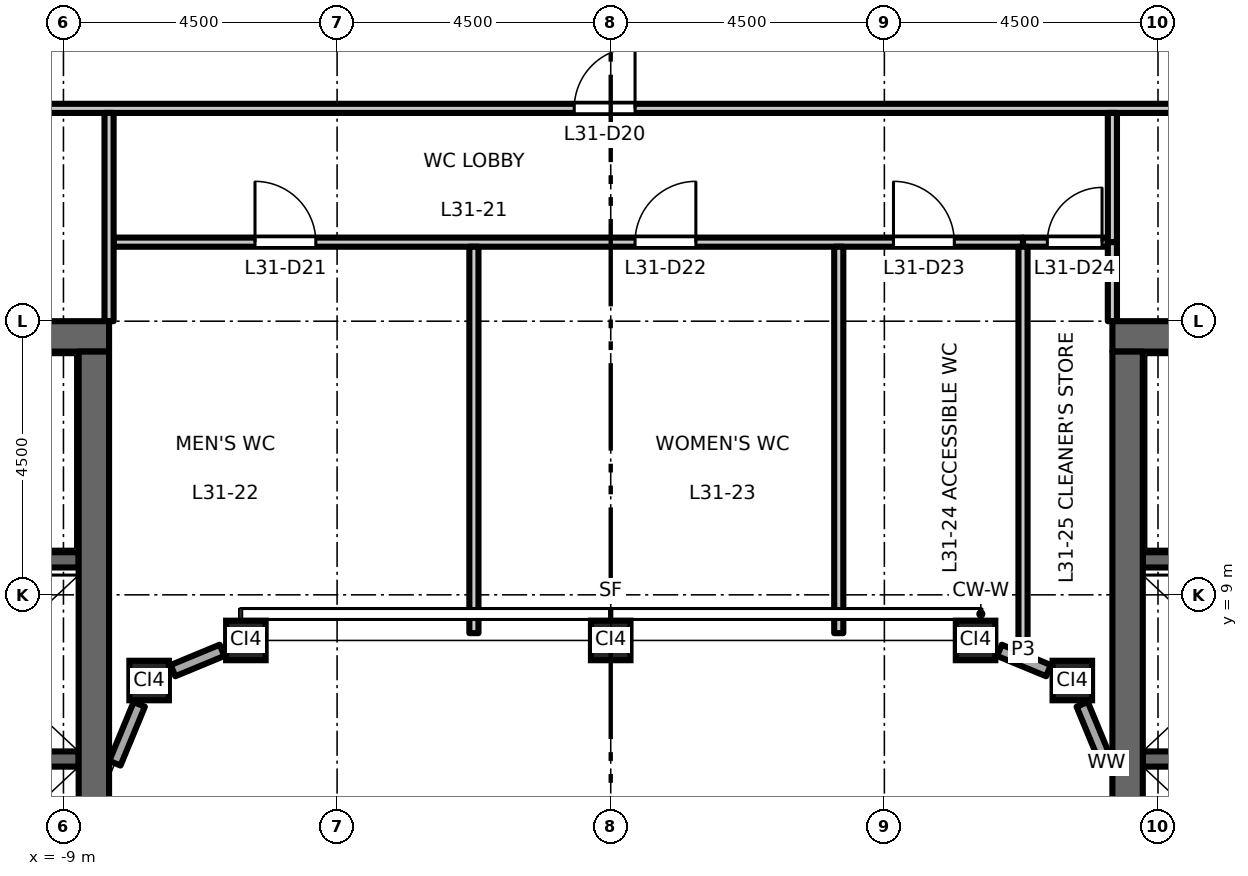
"""IFC4 building model, lengths in metres.
Left out: names, types, materials, properties, quantities, classifications, styles, units other than length and angle.
Written with IfcOpenShell. Run it as: python <this file> out.ifc"""

import sys

from ifc_helpers import new_model, si_unit, direction, frame, frame_2d, origin, origin_2d, place, context, subcontext, project, spatial, rectangle, hollow_rectangle, extrude, element, fill, save


model = new_model("IFC4")
c1 = context("Model", 3, precision=1e-05, world=origin(), true_north=direction((0.0, 1.0)))
c2 = subcontext(c1, "Body", "Model", "MODEL_VIEW")
j1 = project(units=[si_unit("LENGTHUNIT", "METRE"), si_unit("PLANEANGLEUNIT", "RADIAN")], contexts=[c1])
p1 = place(None, origin())
s1 = spatial("IfcSite", under=j1, at=p1, CompositionType="ELEMENT")
p2 = place(p1, origin())
s2 = spatial("IfcBuilding", under=s1, at=p2, CompositionType="ELEMENT")
p3 = place(p2, frame((0.0, 0.0, 145.2)))
s3 = spatial("IfcBuildingStorey", under=s2, at=p3, CompositionType="ELEMENT", Elevation=145.2)
for number, where, z_axis, x_axis in (
    (1, (-7.591, 7.591, 0.0), (0.0, 0.0, 1.0), (1.0, 0.0, 0.0)),
    (2, (-6.0, 8.25, 0.0), (0.0, 0.0, 1.0), (1.0, 0.0, 0.0)),
    (3, (0.0, 8.25, 0.0), (0.0, 0.0, 1.0), (1.0, 0.0, 0.0)),
    (4, (6.0, 8.25, 0.0), (0.0, 0.0, 1.0), (1.0, 0.0, 0.0)),
    (5, (7.591, 7.591, 0.0), (0.0, 0.0, 1.0), (1.0, 0.0, 0.0)),
):
    element("IfcColumn", number, at=place(p3, frame(where, z_axis=z_axis, x_axis=x_axis)), inside=s3, PredefinedType="COLUMN", context=c2, shape_type="SweptSolid", body=[
        extrude(hollow_rectangle(XDim=0.65, YDim=0.65, WallThickness=0.036, at=origin_2d()), origin(), (0.0, 0.0, 1.0), 4.5),
    ])
p4 = place(p3, frame((-8.75, 6.3, 0.0), z_axis=(0.0, 0.0, 1.0), x_axis=(-1.0, 0.0, 0.0)))
e6 = element("IfcWall", 6, at=p4, inside=s3, PredefinedType="SHEAR", context=c2, shape_type="SweptSolid", body=[
    extrude(rectangle(XDim=3.1, YDim=0.25, at=frame_2d((1.55, 0.0))), origin(), (0.0, 0.0, 1.0), 4.35),
])
p5 = place(p3, frame((-8.75, 9.575, 0.0), z_axis=(0.0, 0.0, 1.0), x_axis=(-1.0, 0.0, 0.0)))
e7 = element("IfcWall", 7, at=p5, inside=s3, PredefinedType="SHEAR", context=c2, shape_type="SweptSolid", body=[
    extrude(rectangle(XDim=8.0, YDim=0.25, at=frame_2d((4.0, 0.0))), origin(), (0.0, 0.0, 1.0), 4.35),
])
p6 = place(p5, frame((6.65, 0.0, 0.0)))
e8 = element("IfcOpeningElement", 8, at=p6, cuts=e7, PredefinedType="OPENING", context=c2, shape_type="SweptSolid", body=[
    extrude(rectangle(XDim=1.1, YDim=2.1, at=frame_2d((0.55, 1.05))), frame((0.0, 0.135, 0.0), z_axis=(0.0, -1.0, 0.0), x_axis=(1.0, 0.0, 0.0)), (0.0, 0.0, 1.0), 0.27),
])
p7 = place(p3, frame((-8.25, 13.25, 0.0), z_axis=(0.0, 0.0, 1.0), x_axis=(-1.0, 0.0, 0.0)))
e9 = element("IfcWall", 9, at=p7, inside=s3, PredefinedType="SHEAR", context=c2, shape_type="SweptSolid", body=[
    extrude(rectangle(XDim=13.5, YDim=0.5, at=frame_2d((6.75, 0.0))), origin(), (0.0, 0.0, 1.0), 4.35),
])
p8 = place(p3, frame((-8.5, -13.0, 0.0), z_axis=(0.0, 0.0, 1.0), x_axis=(0.0, 1.0, 0.0)))
e10 = element("IfcWall", 10, at=p8, inside=s3, PredefinedType="SHEAR", context=c2, shape_type="SweptSolid", body=[
    extrude(rectangle(XDim=26.0, YDim=0.5, at=frame_2d((13.0, 0.0))), origin(), (0.0, 0.0, 1.0), 4.35),
])
p9 = place(p3, frame((8.75, 6.3, 0.0), z_axis=(0.0, 0.0, 1.0), x_axis=(1.0, 0.0, 0.0)))
e11 = element("IfcWall", 11, at=p9, inside=s3, PredefinedType="SHEAR", context=c2, shape_type="SweptSolid", body=[
    extrude(rectangle(XDim=3.1, YDim=0.25, at=frame_2d((1.55, 0.0))), origin(), (0.0, 0.0, 1.0), 4.35),
])
p10 = place(p3, frame((8.75, 9.575, 0.0), z_axis=(0.0, 0.0, 1.0), x_axis=(1.0, 0.0, 0.0)))
e12 = element("IfcWall", 12, at=p10, inside=s3, PredefinedType="SHEAR", context=c2, shape_type="SweptSolid", body=[
    extrude(rectangle(XDim=8.0, YDim=0.25, at=frame_2d((4.0, 0.0))), origin(), (0.0, 0.0, 1.0), 4.35),
])
p11 = place(p10, frame((6.65, 0.0, 0.0)))
e13 = element("IfcOpeningElement", 13, at=p11, cuts=e12, PredefinedType="OPENING", context=c2, shape_type="SweptSolid", body=[
    extrude(rectangle(XDim=1.1, YDim=2.1, at=frame_2d((0.55, 1.05))), frame((0.0, 0.135, 0.0), z_axis=(0.0, -1.0, 0.0), x_axis=(1.0, 0.0, 0.0)), (0.0, 0.0, 1.0), 0.27),
])
p12 = place(p3, frame((8.25, 13.25, 0.0), z_axis=(0.0, 0.0, 1.0), x_axis=(1.0, 0.0, 0.0)))
e14 = element("IfcWall", 14, at=p12, inside=s3, PredefinedType="SHEAR", context=c2, shape_type="SweptSolid", body=[
    extrude(rectangle(XDim=13.5, YDim=0.5, at=frame_2d((6.75, 0.0))), origin(), (0.0, 0.0, 1.0), 4.35),
])
p13 = place(p3, frame((8.5, -13.0, 0.0), z_axis=(0.0, 0.0, 1.0), x_axis=(0.0, 1.0, 0.0)))
e15 = element("IfcWall", 15, at=p13, inside=s3, PredefinedType="SHEAR", context=c2, shape_type="SweptSolid", body=[
    extrude(rectangle(XDim=26.0, YDim=0.5, at=frame_2d((13.0, 0.0))), origin(), (0.0, 0.0, 1.0), 4.35),
])
p14 = place(p3, frame((8.154, 6.231, 0.0), z_axis=(0.0, 0.0, 1.0), x_axis=(-0.382694858887, 0.923874799408, 0.0)))
e16 = element("IfcWall", 16, at=p14, inside=s3, PredefinedType="STANDARD", context=c2, shape_type="SweptSolid", body=[
    extrude(rectangle(XDim=1.048, YDim=0.2, at=frame_2d((0.524, 0.0))), origin(), (0.0, 0.0, 1.0), 3.826),
])
for number, where, z_axis, x_axis in (
    (17, (7.199, 7.753, 0.0), (0.0, 0.0, 1.0), (-0.924, 0.383, 0.0)),
    (18, (-6.392, 8.087, 0.0), (0.0, 0.0, 1.0), (-0.924, -0.383, 0.0)),
):
    element("IfcWall", number, at=place(p3, frame(where, z_axis=z_axis, x_axis=x_axis)), inside=s3, PredefinedType="STANDARD", context=c2, shape_type="SweptSolid", body=[
        extrude(rectangle(XDim=0.873, YDim=0.2, at=frame_2d((0.437, 0.0))), origin(), (0.0, 0.0, 1.0), 3.826),
    ])
p15 = place(p3, frame((-7.753, 7.199, 0.0), z_axis=(0.0, 0.0, 1.0), x_axis=(-0.382694858887, -0.923874799408, 0.0)))
e19 = element("IfcWall", 19, at=p15, inside=s3, PredefinedType="STANDARD", context=c2, shape_type="SweptSolid", body=[
    extrude(rectangle(XDim=1.048, YDim=0.2, at=frame_2d((0.524, 0.0))), origin(), (0.0, 0.0, 1.0), 3.826),
])
p16 = place(p3, frame((-8.175, 14.8, 0.0), z_axis=(0.0, 0.0, 1.0), x_axis=(1.0, 0.0, 0.0)))
e20 = element("IfcWall", 20, at=p16, inside=s3, PredefinedType="PARTITIONING", context=c2, shape_type="SweptSolid", body=[
    extrude(rectangle(XDim=14.955, YDim=0.15, at=frame_2d((7.478, 0.0))), origin(), (0.0, 0.0, 1.0), 4.35),
])
p17 = place(p16, frame((2.325, 0.0, 0.0)))
e21 = element("IfcOpeningElement", 21, at=p17, cuts=e20, PredefinedType="OPENING", context=c2, shape_type="SweptSolid", body=[
    extrude(rectangle(XDim=1.0, YDim=2.1, at=frame_2d((0.5, 1.05))), frame((0.0, 0.085, 0.0), z_axis=(0.0, -1.0, 0.0), x_axis=(1.0, 0.0, 0.0)), (0.0, 0.0, 1.0), 0.17),
])
p18 = place(p16, frame((8.575, 0.0, 0.0)))
e22 = element("IfcOpeningElement", 22, at=p18, cuts=e20, PredefinedType="OPENING", context=c2, shape_type="SweptSolid", body=[
    extrude(rectangle(XDim=1.0, YDim=2.1, at=frame_2d((0.5, 1.05))), frame((0.0, 0.085, 0.0), z_axis=(0.0, -1.0, 0.0), x_axis=(1.0, 0.0, 0.0)), (0.0, 0.0, 1.0), 0.17),
])
p19 = place(p16, frame((12.825, 0.0, 0.0)))
e23 = element("IfcOpeningElement", 23, at=p19, cuts=e20, PredefinedType="OPENING", context=c2, shape_type="SweptSolid", body=[
    extrude(rectangle(XDim=1.0, YDim=2.1, at=frame_2d((0.5, 1.05))), frame((0.0, 0.085, 0.0), z_axis=(0.0, -1.0, 0.0), x_axis=(1.0, 0.0, 0.0)), (0.0, 0.0, 1.0), 0.17),
])
p20 = place(p3, frame((6.78, 14.8, 0.0), z_axis=(0.0, 0.0, 1.0), x_axis=(1.0, 0.0, 0.0)))
e24 = element("IfcWall", 24, at=p20, inside=s3, PredefinedType="PARTITIONING", context=c2, shape_type="SweptSolid", body=[
    extrude(rectangle(XDim=1.395, YDim=0.15, at=frame_2d((0.698, 0.0))), origin(), (0.0, 0.0, 1.0), 4.35),
])
p21 = place(p20, frame((0.4, 0.0, 0.0)))
e25 = element("IfcOpeningElement", 25, at=p21, cuts=e24, PredefinedType="OPENING", context=c2, shape_type="SweptSolid", body=[
    extrude(rectangle(XDim=0.9, YDim=2.1, at=frame_2d((0.45, 1.05))), frame((0.0, 0.085, 0.0), z_axis=(0.0, -1.0, 0.0), x_axis=(1.0, 0.0, 0.0)), (0.0, 0.0, 1.0), 0.17),
])
p22 = place(p3, frame((-21.825, 17.0, 0.0), z_axis=(0.0, 0.0, 1.0), x_axis=(1.0, 0.0, 0.0)))
e26 = element("IfcWall", 26, at=p22, inside=s3, PredefinedType="PARTITIONING", context=c2, shape_type="SweptSolid", body=[
    extrude(rectangle(XDim=43.65, YDim=0.15, at=frame_2d((21.825, 0.0))), origin(), (0.0, 0.0, 1.0), 4.35),
])
p23 = place(p22, frame((21.225, 0.0, 0.0)))
e27 = element("IfcOpeningElement", 27, at=p23, cuts=e26, PredefinedType="OPENING", context=c2, shape_type="SweptSolid", body=[
    extrude(rectangle(XDim=1.0, YDim=2.1, at=frame_2d((0.5, 1.05))), frame((0.0, 0.085, 0.0), z_axis=(0.0, -1.0, 0.0), x_axis=(1.0, 0.0, 0.0)), (0.0, 0.0, 1.0), 0.17),
])
p24 = place(p22, frame((6.225, 0.0, 0.0)))
e28 = element("IfcOpeningElement", 28, at=p24, cuts=e26, PredefinedType="OPENING", context=c2, shape_type="SweptSolid", body=[
    extrude(rectangle(XDim=1.0, YDim=2.1, at=frame_2d((0.5, 1.05))), frame((0.0, 0.085, 0.0), z_axis=(0.0, -1.0, 0.0), x_axis=(1.0, 0.0, 0.0)), (0.0, 0.0, 1.0), 0.17),
])
p25 = place(p22, frame((36.225, 0.0, 0.0)))
e29 = element("IfcOpeningElement", 29, at=p25, cuts=e26, PredefinedType="OPENING", context=c2, shape_type="SweptSolid", body=[
    extrude(rectangle(XDim=1.0, YDim=2.1, at=frame_2d((0.5, 1.05))), frame((0.0, 0.085, 0.0), z_axis=(0.0, -1.0, 0.0), x_axis=(1.0, 0.0, 0.0)), (0.0, 0.0, 1.0), 0.17),
])
p26 = place(p3, frame((-8.25, 13.5, 0.0), z_axis=(0.0, 0.0, 1.0), x_axis=(0.0, 1.0, 0.0)))
e30 = element("IfcWall", 30, at=p26, inside=s3, PredefinedType="PARTITIONING", context=c2, shape_type="SweptSolid", body=[
    extrude(rectangle(XDim=3.425, YDim=0.15, at=frame_2d((1.712, 0.0))), origin(), (0.0, 0.0, 1.0), 4.35),
])
for number, where, z_axis, x_axis in (
    (31, (-2.25, 8.37, 0.0), (0.0, 0.0, 1.0), (0.0, 1.0, 0.0)),
    (32, (3.75, 8.37, 0.0), (0.0, 0.0, 1.0), (0.0, 1.0, 0.0)),
):
    element("IfcWall", number, at=place(p3, frame(where, z_axis=z_axis, x_axis=x_axis)), inside=s3, PredefinedType="PARTITIONING", context=c2, shape_type="SweptSolid", body=[
        extrude(rectangle(XDim=6.355, YDim=0.15, at=frame_2d((3.177, 0.0))), origin(), (0.0, 0.0, 1.0), 4.35),
    ])
p27 = place(p3, frame((6.78, 8.087, 0.0), z_axis=(0.0, 0.0, 1.0), x_axis=(0.0, 1.0, 0.0)))
e33 = element("IfcWall", 33, at=p27, inside=s3, PredefinedType="PARTITIONING", context=c2, shape_type="SweptSolid", body=[
    extrude(rectangle(XDim=6.638, YDim=0.15, at=frame_2d((3.319, 0.0))), origin(), (0.0, 0.0, 1.0), 4.35),
])
p28 = place(p3, frame((8.25, 14.8, 0.0), z_axis=(0.0, 0.0, 1.0), x_axis=(0.0, 1.0, 0.0)))
e34 = element("IfcWall", 34, at=p28, inside=s3, PredefinedType="PARTITIONING", context=c2, shape_type="SweptSolid", body=[
    extrude(rectangle(XDim=2.125, YDim=0.15, at=frame_2d((1.062, 0.0))), origin(), (0.0, 0.0, 1.0), 4.35),
])
p29 = place(p3, frame((8.25, 13.5, 0.0), z_axis=(0.0, 0.0, 1.0), x_axis=(0.0, 1.0, 0.0)))
e35 = element("IfcWall", 35, at=p29, inside=s3, PredefinedType="PARTITIONING", context=c2, shape_type="SweptSolid", body=[
    extrude(rectangle(XDim=1.3, YDim=0.15, at=frame_2d((0.65, 0.0))), origin(), (0.0, 0.0, 1.0), 4.35),
])
p30 = place(p23, origin())
e36 = element("IfcDoor", 36, at=p30, inside=s3, OperationType="SINGLE_SWING_RIGHT", PredefinedType="DOOR", context=c2, shape_type="SweptSolid", body=[
    extrude(rectangle(XDim=1.0, YDim=2.1, at=frame_2d((0.5, 1.05))), frame((0.0, 0.025, 0.0), z_axis=(0.0, -1.0, 0.0), x_axis=(1.0, 0.0, 0.0)), (0.0, 0.0, 1.0), 0.05),
])
fill(e27, e36)
p31 = place(p17, origin())
e37 = element("IfcDoor", 37, at=p31, inside=s3, OperationType="SINGLE_SWING_LEFT", PredefinedType="DOOR", context=c2, shape_type="SweptSolid", body=[
    extrude(rectangle(XDim=1.0, YDim=2.1, at=frame_2d((0.5, 1.05))), frame((0.0, 0.025, 0.0), z_axis=(0.0, -1.0, 0.0), x_axis=(1.0, 0.0, 0.0)), (0.0, 0.0, 1.0), 0.05),
])
fill(e21, e37)
p32 = place(p18, origin())
e38 = element("IfcDoor", 38, at=p32, inside=s3, OperationType="SINGLE_SWING_RIGHT", PredefinedType="DOOR", context=c2, shape_type="SweptSolid", body=[
    extrude(rectangle(XDim=1.0, YDim=2.1, at=frame_2d((0.5, 1.05))), frame((0.0, 0.025, 0.0), z_axis=(0.0, -1.0, 0.0), x_axis=(1.0, 0.0, 0.0)), (0.0, 0.0, 1.0), 0.05),
])
fill(e22, e38)
p33 = place(p19, origin())
e39 = element("IfcDoor", 39, at=p33, inside=s3, OperationType="SINGLE_SWING_LEFT", PredefinedType="DOOR", context=c2, shape_type="SweptSolid", body=[
    extrude(rectangle(XDim=1.0, YDim=2.1, at=frame_2d((0.5, 1.05))), frame((0.0, 0.025, 0.0), z_axis=(0.0, -1.0, 0.0), x_axis=(1.0, 0.0, 0.0)), (0.0, 0.0, 1.0), 0.05),
])
fill(e23, e39)
p34 = place(p21, origin())
e40 = element("IfcDoor", 40, at=p34, inside=s3, OperationType="SINGLE_SWING_RIGHT", PredefinedType="DOOR", context=c2, shape_type="SweptSolid", body=[
    extrude(rectangle(XDim=0.9, YDim=2.1, at=frame_2d((0.45, 1.05))), frame((0.0, 0.025, 0.0), z_axis=(0.0, -1.0, 0.0), x_axis=(1.0, 0.0, 0.0)), (0.0, 0.0, 1.0), 0.05),
])
fill(e25, e40)
save(model, sys.argv[1])
